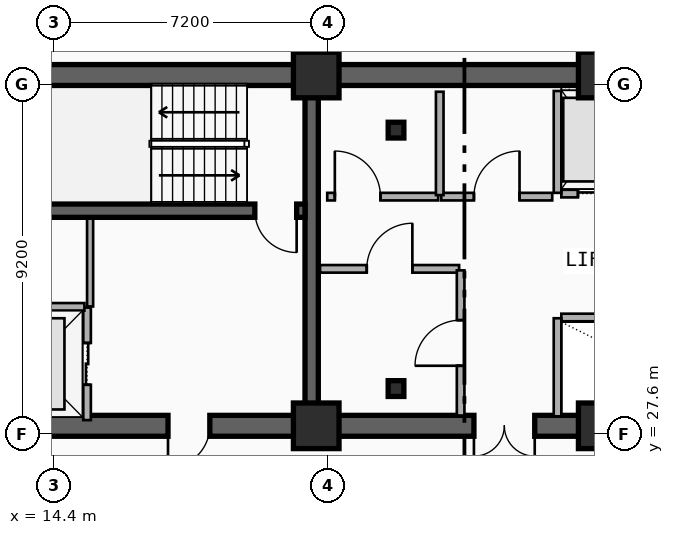
"""IFC4 building model, lengths in metres.
Left out: names, types, materials, properties, quantities, classifications, styles, units other than length and angle.
Written with IfcOpenShell. Run it as: python <this file> out.ifc"""

import sys

from ifc_helpers import new_model, si_unit, direction, frame, frame_2d, origin, origin_2d, place, context, subcontext, project, spatial, rectangle, i_section, extrude, element, fill, save


model = new_model("IFC4")
c1 = context("Model", 3, precision=1e-05, world=origin(), true_north=direction((0.0, 1.0)))
c2 = subcontext(c1, "Body", "Model", "MODEL_VIEW")
j1 = project(units=[si_unit("LENGTHUNIT", "METRE"), si_unit("PLANEANGLEUNIT", "RADIAN")], contexts=[c1])
p1 = place(None, origin())
s1 = spatial("IfcSite", under=j1, at=p1, CompositionType="ELEMENT")
p2 = place(p1, origin())
s2 = spatial("IfcBuilding", under=s1, at=p2, CompositionType="ELEMENT")
p3 = place(p2, frame((0.0, 0.0, 159.0)))
s3 = spatial("IfcBuildingStorey", under=s2, at=p3, CompositionType="ELEMENT", Elevation=159.0)
p4 = place(p3, frame((12.15, 37.05, 0.0), z_axis=(0.0, 0.0, 1.0), x_axis=(1.0, 0.0, 0.0)))
e1 = element("IfcWall", 1, at=p4, inside=s3, PredefinedType="SHEAR", context=c2, shape_type="SweptSolid", body=[
    extrude(rectangle(XDim=33.23, YDim=0.55, at=frame_2d((16.615, 0.0))), origin(), (0.0, 0.0, 1.0), 3.55),
])
p5 = place(p3, frame((21.18, 27.82, 0.0), z_axis=(0.0, 0.0, 1.0), x_axis=(-1.0, 0.0, 0.0)))
e2 = element("IfcWall", 2, at=p5, inside=s3, PredefinedType="SHEAR", context=c2, shape_type="SweptSolid", body=[
    extrude(rectangle(XDim=9.03, YDim=0.55, at=frame_2d((4.515, 0.0))), origin(), (0.0, 0.0, 1.0), 3.55),
])
p6 = place(p5, frame((2.68, 0.0, 0.0)))
e3 = element("IfcOpeningElement", 3, at=p6, cuts=e2, PredefinedType="OPENING", context=c2, shape_type="SweptSolid", body=[
    extrude(rectangle(XDim=1.1, YDim=2.15, at=frame_2d((0.55, 1.075))), frame((0.0, 0.285, 0.0), z_axis=(0.0, -1.0, 0.0), x_axis=(1.0, 0.0, 0.0)), (0.0, 0.0, 1.0), 0.57),
])
p7 = place(p3, frame((33.15, 27.82, 0.0), z_axis=(0.0, 0.0, 1.0), x_axis=(-1.0, 0.0, 0.0)))
e4 = element("IfcWall", 4, at=p7, inside=s3, PredefinedType="SHEAR", context=c2, shape_type="SweptSolid", body=[
    extrude(rectangle(XDim=11.97, YDim=0.55, at=frame_2d((5.985, 0.0))), origin(), (0.0, 0.0, 1.0), 3.55),
])
p8 = place(p7, frame((6.1, 0.0, 0.0)))
e5 = element("IfcOpeningElement", 5, at=p8, cuts=e4, PredefinedType="OPENING", context=c2, shape_type="SweptSolid", body=[
    extrude(rectangle(XDim=1.6, YDim=2.2, at=frame_2d((0.8, 1.1))), frame((0.0, 0.285, 0.0), z_axis=(0.0, -1.0, 0.0), x_axis=(1.0, 0.0, 0.0)), (0.0, 0.0, 1.0), 0.57),
])
p9 = place(p3, frame((21.18, 28.095, 0.0), z_axis=(0.0, 0.0, 1.0), x_axis=(0.0, 1.0, 0.0)))
e6 = element("IfcWall", 6, at=p9, inside=s3, PredefinedType="SHEAR", context=c2, shape_type="SweptSolid", body=[
    extrude(rectangle(XDim=8.68, YDim=0.35, at=frame_2d((4.34, 0.0))), origin(), (0.0, 0.0, 1.0), 3.55),
])
p10 = place(p3, frame((21.005, 33.48, 0.0), z_axis=(0.0, 0.0, 1.0), x_axis=(-1.0, 0.0, 0.0)))
e7 = element("IfcWall", 7, at=p10, inside=s3, PredefinedType="SHEAR", context=c2, shape_type="SweptSolid", body=[
    extrude(rectangle(XDim=8.58, YDim=0.35, at=frame_2d((4.29, 0.0))), origin(), (0.0, 0.0, 1.0), 3.55),
])
p11 = place(p10, frame((0.22, 0.0, 0.0)))
e8 = element("IfcOpeningElement", 8, at=p11, cuts=e7, PredefinedType="OPENING", context=c2, shape_type="SweptSolid", body=[
    extrude(rectangle(XDim=1.1, YDim=2.15, at=frame_2d((0.55, 1.075))), frame((0.0, 0.185, 0.0), z_axis=(0.0, -1.0, 0.0), x_axis=(1.0, 0.0, 0.0)), (0.0, 0.0, 1.0), 0.37),
])
for number, where, z_axis, x_axis in (
    (9, (23.4, 28.8, 0.0), (0.0, 0.0, 1.0), (1.0, 0.0, 0.0)),
    (10, (23.4, 35.6, 0.0), (0.0, 0.0, 1.0), (1.0, 0.0, 0.0)),
):
    element("IfcColumn", number, at=place(p3, frame(where, z_axis=z_axis, x_axis=x_axis)), inside=s3, PredefinedType="COLUMN", context=c2, shape_type="SweptSolid", body=[
        extrude(i_section(OverallWidth=0.413, OverallDepth=0.415, WebThickness=0.03, FlangeThickness=0.047, FilletRadius=0.015, at=origin_2d()), origin(), (0.0, 0.0, 1.0), 3.55),
    ])
for number, where, z_axis, x_axis in (
    (11, (21.3, 27.82, 0.0), (0.0, 0.0, 1.0), (1.0, 0.0, 0.0)),
    (12, (21.3, 37.05, 0.0), (0.0, 0.0, 1.0), (1.0, 0.0, 0.0)),
    (13, (28.8, 27.82, 0.0), (0.0, 0.0, 1.0), (1.0, 0.0, 0.0)),
    (14, (28.8, 37.05, 0.0), (0.0, 0.0, 1.0), (1.0, 0.0, 0.0)),
):
    element("IfcColumn", number, at=place(p3, frame(where, z_axis=z_axis, x_axis=x_axis)), inside=s3, PredefinedType="COLUMN", context=c2, shape_type="SweptSolid", body=[
        extrude(rectangle(XDim=1.2, YDim=1.2, at=origin_2d()), origin(), (0.0, 0.0, 1.0), 3.55),
    ])
p12 = place(p3, frame((15.27, 27.97, 0.0), z_axis=(0.0, 0.0, 1.0), x_axis=(0.0, 1.0, 0.0)))
e15 = element("IfcWall", 15, at=p12, inside=s3, PredefinedType="PARTITIONING", context=c2, shape_type="SweptSolid", body=[
    extrude(rectangle(XDim=2.96, YDim=0.2, at=frame_2d((1.48, 0.0))), origin(), (0.0, 0.0, 1.0), 2.36),
])
p13 = place(p12, frame((0.93, 0.0, 0.0)))
e16 = element("IfcOpeningElement", 16, at=p13, cuts=e15, PredefinedType="OPENING", context=c2, shape_type="SweptSolid", body=[
    extrude(rectangle(XDim=1.1, YDim=2.15, at=frame_2d((0.55, 1.075))), frame((0.0, 0.11, 0.0), z_axis=(0.0, -1.0, 0.0), x_axis=(1.0, 0.0, 0.0)), (0.0, 0.0, 1.0), 0.22),
])
p14 = place(p3, frame((12.45, 30.95, 0.0), z_axis=(0.0, 0.0, 1.0), x_axis=(1.0, 0.0, 0.0)))
e17 = element("IfcWall", 17, at=p14, inside=s3, PredefinedType="PARTITIONING", context=c2, shape_type="SweptSolid", body=[
    extrude(rectangle(XDim=2.75, YDim=0.2, at=frame_2d((1.375, 0.0))), origin(), (0.0, 0.0, 1.0), 2.36),
])
p15 = place(p3, frame((27.75, 30.67, 0.0), z_axis=(0.0, 0.0, 1.0), x_axis=(1.0, 0.0, 0.0)))
e18 = element("IfcWall", 18, at=p15, inside=s3, PredefinedType="PARTITIONING", context=c2, shape_type="SweptSolid", body=[
    extrude(rectangle(XDim=1.975, YDim=0.2, at=frame_2d((0.988, 0.0))), origin(), (0.0, 0.0, 1.0), 2.36),
])
p16 = place(p3, frame((27.65, 28.07, 0.0), z_axis=(0.0, 0.0, 1.0), x_axis=(0.0, 1.0, 0.0)))
e19 = element("IfcWall", 19, at=p16, inside=s3, PredefinedType="PARTITIONING", context=c2, shape_type="SweptSolid", body=[
    extrude(rectangle(XDim=2.58, YDim=0.2, at=frame_2d((1.29, 0.0))), origin(), (0.0, 0.0, 1.0), 2.36),
])
p17 = place(p3, frame((27.75, 33.93, 0.0), z_axis=(0.0, 0.0, 1.0), x_axis=(1.0, 0.0, 0.0)))
e20 = element("IfcWall", 20, at=p17, inside=s3, PredefinedType="PARTITIONING", context=c2, shape_type="SweptSolid", body=[
    extrude(rectangle(XDim=1.975, YDim=0.2, at=frame_2d((0.988, 0.0))), origin(), (0.0, 0.0, 1.0), 2.36),
])
p18 = place(p17, frame((0.438, 0.0, 0.0)))
e21 = element("IfcOpeningElement", 21, at=p18, cuts=e20, PredefinedType="OPENING", context=c2, shape_type="SweptSolid", body=[
    extrude(rectangle(XDim=1.1, YDim=2.15, at=frame_2d((0.55, 1.075))), frame((0.0, 0.11, 0.0), z_axis=(0.0, -1.0, 0.0), x_axis=(1.0, 0.0, 0.0)), (0.0, 0.0, 1.0), 0.22),
])
p19 = place(p3, frame((27.65, 33.95, 0.0), z_axis=(0.0, 0.0, 1.0), x_axis=(0.0, 1.0, 0.0)))
e22 = element("IfcWall", 22, at=p19, inside=s3, PredefinedType="PARTITIONING", context=c2, shape_type="SweptSolid", body=[
    extrude(rectangle(XDim=2.68, YDim=0.2, at=frame_2d((1.34, 0.0))), origin(), (0.0, 0.0, 1.0), 2.36),
])
p20 = place(p3, frame((21.4, 31.95, 0.0), z_axis=(0.0, 0.0, 1.0), x_axis=(1.0, 0.0, 0.0)))
e23 = element("IfcWall", 23, at=p20, inside=s3, PredefinedType="PARTITIONING", context=c2, shape_type="SweptSolid", body=[
    extrude(rectangle(XDim=3.66, YDim=0.2, at=frame_2d((1.83, 0.0))), origin(), (0.0, 0.0, 1.0), 2.36),
])
p21 = place(p20, frame((1.23, 0.0, 0.0)))
e24 = element("IfcOpeningElement", 24, at=p21, cuts=e23, PredefinedType="OPENING", context=c2, shape_type="SweptSolid", body=[
    extrude(rectangle(XDim=1.2, YDim=2.15, at=frame_2d((0.6, 1.075))), frame((0.0, 0.11, 0.0), z_axis=(0.0, -1.0, 0.0), x_axis=(1.0, 0.0, 0.0)), (0.0, 0.0, 1.0), 0.22),
])
p22 = place(p3, frame((21.59, 33.85, 0.0), z_axis=(0.0, 0.0, 1.0), x_axis=(1.0, 0.0, 0.0)))
e25 = element("IfcWall", 25, at=p22, inside=s3, PredefinedType="PARTITIONING", context=c2, shape_type="SweptSolid", body=[
    extrude(rectangle(XDim=2.92, YDim=0.2, at=frame_2d((1.46, 0.0))), origin(), (0.0, 0.0, 1.0), 2.36),
])
p23 = place(p22, frame((0.2, 0.0, 0.0)))
e26 = element("IfcOpeningElement", 26, at=p23, cuts=e25, PredefinedType="OPENING", context=c2, shape_type="SweptSolid", body=[
    extrude(rectangle(XDim=1.2, YDim=2.15, at=frame_2d((0.6, 1.075))), frame((0.0, 0.11, 0.0), z_axis=(0.0, -1.0, 0.0), x_axis=(1.0, 0.0, 0.0)), (0.0, 0.0, 1.0), 0.22),
])
p24 = place(p3, frame((24.59, 33.85, 0.0), z_axis=(0.0, 0.0, 1.0), x_axis=(1.0, 0.0, 0.0)))
e27 = element("IfcWall", 27, at=p24, inside=s3, PredefinedType="PARTITIONING", context=c2, shape_type="SweptSolid", body=[
    extrude(rectangle(XDim=2.92, YDim=0.2, at=frame_2d((1.46, 0.0))), origin(), (0.0, 0.0, 1.0), 3.29),
])
p25 = place(p24, frame((0.86, 0.0, 0.0)))
e28 = element("IfcOpeningElement", 28, at=p25, cuts=e27, PredefinedType="OPENING", context=c2, shape_type="SweptSolid", body=[
    extrude(rectangle(XDim=1.2, YDim=2.15, at=frame_2d((0.6, 1.075))), frame((0.0, 0.11, 0.0), z_axis=(0.0, -1.0, 0.0), x_axis=(1.0, 0.0, 0.0)), (0.0, 0.0, 1.0), 0.22),
])
p26 = place(p3, frame((25.1, 28.09, 0.0), z_axis=(0.0, 0.0, 1.0), x_axis=(0.0, 1.0, 0.0)))
e29 = element("IfcWall", 29, at=p26, inside=s3, PredefinedType="PARTITIONING", context=c2, shape_type="SweptSolid", body=[
    extrude(rectangle(XDim=3.82, YDim=0.2, at=frame_2d((1.91, 0.0))), origin(), (0.0, 0.0, 1.0), 2.67),
])
p27 = place(p26, frame((1.31, 0.0, 0.0)))
e30 = element("IfcOpeningElement", 30, at=p27, cuts=e29, PredefinedType="OPENING", context=c2, shape_type="SweptSolid", body=[
    extrude(rectangle(XDim=1.2, YDim=2.15, at=frame_2d((0.6, 1.075))), frame((0.0, 0.11, 0.0), z_axis=(0.0, -1.0, 0.0), x_axis=(1.0, 0.0, 0.0)), (0.0, 0.0, 1.0), 0.22),
])
p28 = place(p3, frame((24.55, 33.89, 0.0), z_axis=(0.0, 0.0, 1.0), x_axis=(0.0, 1.0, 0.0)))
e31 = element("IfcWall", 31, at=p28, inside=s3, PredefinedType="PARTITIONING", context=c2, shape_type="SweptSolid", body=[
    extrude(rectangle(XDim=2.72, YDim=0.2, at=frame_2d((1.36, 0.0))), origin(), (0.0, 0.0, 1.0), 3.29),
])
p29 = place(p3, frame((15.35, 30.96, 0.0), z_axis=(0.0, 0.0, 1.0), x_axis=(0.0, 1.0, 0.0)))
e32 = element("IfcWall", 32, at=p29, inside=s3, PredefinedType="PARTITIONING", context=c2, shape_type="SweptSolid", body=[
    extrude(rectangle(XDim=2.31, YDim=0.16, at=frame_2d((1.155, 0.0))), origin(), (0.0, 0.0, 1.0), 3.29),
])
p30 = place(p13, origin())
e33 = element("IfcDoor", 33, at=p30, inside=s3, OperationType="DOUBLE_DOOR_SLIDING", PredefinedType="DOOR", context=c2, shape_type="SweptSolid", body=[
    extrude(rectangle(XDim=1.1, YDim=2.15, at=frame_2d((0.55, 1.075))), frame((0.0, 0.025, 0.0), z_axis=(0.0, -1.0, 0.0), x_axis=(1.0, 0.0, 0.0)), (0.0, 0.0, 1.0), 0.05),
])
fill(e16, e33)
p31 = place(p18, origin())
e34 = element("IfcDoor", 34, at=p31, inside=s3, OperationType="DOUBLE_DOOR_SLIDING", PredefinedType="DOOR", context=c2, shape_type="SweptSolid", body=[
    extrude(rectangle(XDim=1.1, YDim=2.15, at=frame_2d((0.55, 1.075))), frame((0.0, 0.025, 0.0), z_axis=(0.0, -1.0, 0.0), x_axis=(1.0, 0.0, 0.0)), (0.0, 0.0, 1.0), 0.05),
])
fill(e21, e34)
p32 = place(p11, origin())
e35 = element("IfcDoor", 35, at=p32, inside=s3, OperationType="SINGLE_SWING_LEFT", PredefinedType="DOOR", context=c2, shape_type="SweptSolid", body=[
    extrude(rectangle(XDim=1.1, YDim=2.15, at=frame_2d((0.55, 1.075))), frame((0.0, 0.025, 0.0), z_axis=(0.0, -1.0, 0.0), x_axis=(1.0, 0.0, 0.0)), (0.0, 0.0, 1.0), 0.05),
])
fill(e8, e35)
p33 = place(p6, origin())
e36 = element("IfcDoor", 36, at=p33, inside=s3, OperationType="SINGLE_SWING_RIGHT", PredefinedType="DOOR", context=c2, shape_type="SweptSolid", body=[
    extrude(rectangle(XDim=1.1, YDim=2.15, at=frame_2d((0.55, 1.075))), frame((0.0, 0.025, 0.0), z_axis=(0.0, -1.0, 0.0), x_axis=(1.0, 0.0, 0.0)), (0.0, 0.0, 1.0), 0.05),
])
fill(e3, e36)
p34 = place(p8, origin())
e37 = element("IfcDoor", 37, at=p34, inside=s3, OperationType="SINGLE_SWING_LEFT", PredefinedType="DOOR", context=c2, shape_type="SweptSolid", body=[
    extrude(rectangle(XDim=1.6, YDim=2.2, at=frame_2d((0.8, 1.1))), frame((0.0, 0.025, 0.0), z_axis=(0.0, -1.0, 0.0), x_axis=(1.0, 0.0, 0.0)), (0.0, 0.0, 1.0), 0.05),
])
fill(e5, e37)
p35 = place(p21, origin())
e38 = element("IfcDoor", 38, at=p35, inside=s3, OperationType="SINGLE_SWING_RIGHT", PredefinedType="DOOR", context=c2, shape_type="SweptSolid", body=[
    extrude(rectangle(XDim=1.2, YDim=2.15, at=frame_2d((0.6, 1.075))), frame((0.0, 0.025, 0.0), z_axis=(0.0, -1.0, 0.0), x_axis=(1.0, 0.0, 0.0)), (0.0, 0.0, 1.0), 0.05),
])
fill(e24, e38)
p36 = place(p23, origin())
e39 = element("IfcDoor", 39, at=p36, inside=s3, OperationType="SINGLE_SWING_LEFT", PredefinedType="DOOR", context=c2, shape_type="SweptSolid", body=[
    extrude(rectangle(XDim=1.2, YDim=2.15, at=frame_2d((0.6, 1.075))), frame((0.0, 0.025, 0.0), z_axis=(0.0, -1.0, 0.0), x_axis=(1.0, 0.0, 0.0)), (0.0, 0.0, 1.0), 0.05),
])
fill(e26, e39)
p37 = place(p25, origin())
e40 = element("IfcDoor", 40, at=p37, inside=s3, OperationType="SINGLE_SWING_RIGHT", PredefinedType="DOOR", context=c2, shape_type="SweptSolid", body=[
    extrude(rectangle(XDim=1.2, YDim=2.15, at=frame_2d((0.6, 1.075))), frame((0.0, 0.025, 0.0), z_axis=(0.0, -1.0, 0.0), x_axis=(1.0, 0.0, 0.0)), (0.0, 0.0, 1.0), 0.05),
])
fill(e28, e40)
p38 = place(p27, origin())
e41 = element("IfcDoor", 41, at=p38, inside=s3, OperationType="SINGLE_SWING_LEFT", PredefinedType="DOOR", context=c2, shape_type="SweptSolid", body=[
    extrude(rectangle(XDim=1.2, YDim=2.15, at=frame_2d((0.6, 1.075))), frame((0.0, 0.025, 0.0), z_axis=(0.0, -1.0, 0.0), x_axis=(1.0, 0.0, 0.0)), (0.0, 0.0, 1.0), 0.05),
])
fill(e30, e41)
save(model, sys.argv[1])
